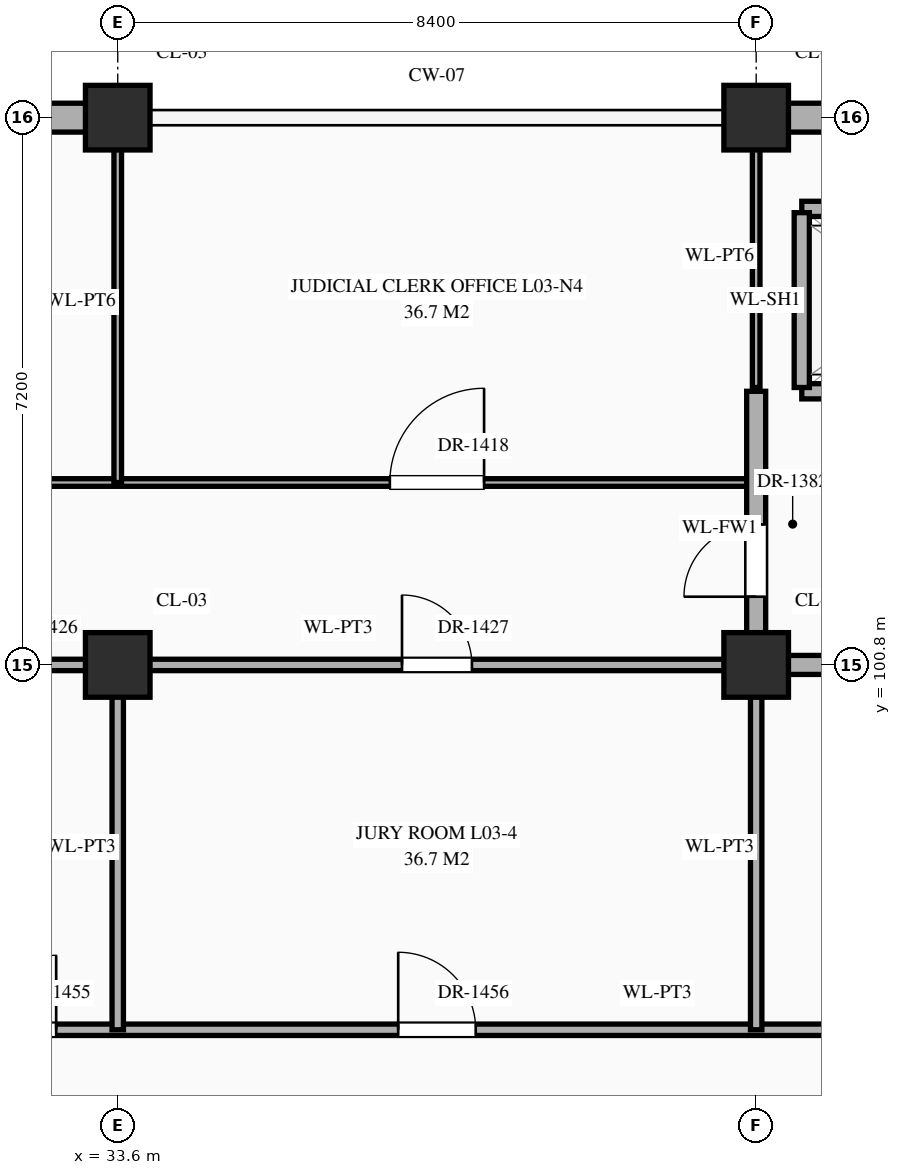
"""IFC4 building model, lengths in metres.
Left out: names, types, materials, properties, quantities, classifications, styles, units other than length and angle.
Written with IfcOpenShell. Run it as: python <this file> out.ifc"""

import sys

from ifc_helpers import new_model, si_unit, direction, frame, frame_2d, origin, origin_2d, place, context, subcontext, project, spatial, rectangle, extrude, element, fill, save


model = new_model("IFC4")
c1 = context("Model", 3, precision=1e-05, world=origin(), true_north=direction((0.0, 1.0)))
c2 = subcontext(c1, "Body", "Model", "MODEL_VIEW")
j1 = project(units=[si_unit("LENGTHUNIT", "METRE"), si_unit("PLANEANGLEUNIT", "RADIAN")], contexts=[c1])
p1 = place(None, origin())
s1 = spatial("IfcSite", under=j1, at=p1, CompositionType="ELEMENT")
p2 = place(p1, origin())
s2 = spatial("IfcBuilding", under=s1, at=p2, CompositionType="ELEMENT")
p3 = place(p2, frame((0.0, 0.0, 10.8)))
s3 = spatial("IfcBuildingStorey", under=s2, at=p3, CompositionType="ELEMENT", Elevation=10.8)
for number, where, z_axis, x_axis in (
    (1, (33.6, 100.8, 0.0), (0.0, 0.0, 1.0), (1.0, 0.0, 0.0)),
    (2, (33.6, 108.0, 0.0), (0.0, 0.0, 1.0), (1.0, 0.0, 0.0)),
    (3, (42.0, 100.8, 0.0), (0.0, 0.0, 1.0), (1.0, 0.0, 0.0)),
    (4, (42.0, 108.0, 0.0), (0.0, 0.0, 1.0), (1.0, 0.0, 0.0)),
):
    element("IfcColumn", number, at=place(p3, frame(where, z_axis=z_axis, x_axis=x_axis)), inside=s3, PredefinedType="COLUMN", context=c2, shape_type="SweptSolid", body=[
        extrude(rectangle(XDim=0.85, YDim=0.85, at=origin_2d()), origin(), (0.0, 0.0, 1.0), 5.4),
    ])
p4 = place(p3, frame((25.62, 108.0, 0.0), z_axis=(0.0, 0.0, 1.0), x_axis=(1.0, 0.0, 0.0)))
e5 = element("IfcWall", 5, at=p4, inside=s3, PredefinedType="STANDARD", context=c2, shape_type="SweptSolid", body=[
    extrude(rectangle(XDim=7.56, YDim=0.38, at=frame_2d((3.78, 0.0))), origin(), (0.0, 0.0, 1.0), 4.47),
])
p5 = place(p4, frame((5.255, 0.0, 0.85)))
e6 = element("IfcOpeningElement", 6, at=p5, cuts=e5, PredefinedType="OPENING", context=c2, shape_type="SweptSolid", body=[
    extrude(rectangle(XDim=1.05, YDim=1.2, at=frame_2d((0.525, 0.6))), frame((0.0, 0.202, 0.0), z_axis=(0.0, -1.0, 0.0), x_axis=(1.0, 0.0, 0.0)), (0.0, 0.0, 1.0), 0.404),
])
p6 = place(p3, frame((42.42, 108.0, 0.0), z_axis=(0.0, 0.0, 1.0), x_axis=(1.0, 0.0, 0.0)))
e7 = element("IfcWall", 7, at=p6, inside=s3, PredefinedType="STANDARD", context=c2, shape_type="SweptSolid", body=[
    extrude(rectangle(XDim=7.535, YDim=0.38, at=frame_2d((3.768, 0.0))), origin(), (0.0, 0.0, 1.0), 4.47),
])
p7 = place(p3, frame((31.0, 96.0, 0.0), z_axis=(0.0, 0.0, 1.0), x_axis=(1.0, 0.0, 0.0)))
e8 = element("IfcWall", 8, at=p7, inside=s3, PredefinedType="STANDARD", context=c2, shape_type="SweptSolid", body=[
    extrude(rectangle(XDim=19.4, YDim=0.15, at=frame_2d((9.7, 0.0))), origin(), (0.0, 0.0, 1.0), 5.12),
])
p8 = place(p7, frame((0.81, 0.0, 0.0)))
e9 = element("IfcOpeningElement", 9, at=p8, cuts=e8, PredefinedType="OPENING", context=c2, shape_type="SweptSolid", body=[
    extrude(rectangle(XDim=0.98, YDim=2.35, at=frame_2d((0.49, 1.175))), frame((0.0, 0.087, 0.0), z_axis=(0.0, -1.0, 0.0), x_axis=(1.0, 0.0, 0.0)), (0.0, 0.0, 1.0), 0.174),
])
p9 = place(p7, frame((6.29, 0.0, 0.0)))
e10 = element("IfcOpeningElement", 10, at=p9, cuts=e8, PredefinedType="OPENING", context=c2, shape_type="SweptSolid", body=[
    extrude(rectangle(XDim=1.02, YDim=2.4, at=frame_2d((0.51, 1.2))), frame((0.0, 0.087, 0.0), z_axis=(0.0, -1.0, 0.0), x_axis=(1.0, 0.0, 0.0)), (0.0, 0.0, 1.0), 0.174),
])
p10 = place(p7, frame((14.67, 0.0, 0.0)))
e11 = element("IfcOpeningElement", 11, at=p10, cuts=e8, PredefinedType="OPENING", context=c2, shape_type="SweptSolid", body=[
    extrude(rectangle(XDim=1.06, YDim=2.4, at=frame_2d((0.53, 1.2))), frame((0.0, 0.087, 0.0), z_axis=(0.0, -1.0, 0.0), x_axis=(1.0, 0.0, 0.0)), (0.0, 0.0, 1.0), 0.174),
])
p11 = place(p3, frame((31.0, 100.8, 0.0), z_axis=(0.0, 0.0, 1.0), x_axis=(1.0, 0.0, 0.0)))
e12 = element("IfcWall", 12, at=p11, inside=s3, PredefinedType="STANDARD", context=c2, shape_type="SweptSolid", body=[
    extrude(rectangle(XDim=11.0, YDim=0.15, at=frame_2d((5.5, 0.0))), origin(), (0.0, 0.0, 1.0), 4.27),
])
p12 = place(p11, frame((0.698, 0.0, 0.0)))
e13 = element("IfcOpeningElement", 13, at=p12, cuts=e12, PredefinedType="OPENING", context=c2, shape_type="SweptSolid", body=[
    extrude(rectangle(XDim=0.86, YDim=2.1, at=frame_2d((0.43, 1.05))), frame((0.0, 0.087, 0.0), z_axis=(0.0, -1.0, 0.0), x_axis=(1.0, 0.0, 0.0)), (0.0, 0.0, 1.0), 0.174),
])
p13 = place(p11, frame((6.34, 0.0, 0.0)))
e14 = element("IfcOpeningElement", 14, at=p13, cuts=e12, PredefinedType="OPENING", context=c2, shape_type="SweptSolid", body=[
    extrude(rectangle(XDim=0.92, YDim=2.15, at=frame_2d((0.46, 1.075))), frame((0.0, 0.087, 0.0), z_axis=(0.0, -1.0, 0.0), x_axis=(1.0, 0.0, 0.0)), (0.0, 0.0, 1.0), 0.174),
])
p14 = place(p3, frame((42.0, 100.8, 0.0), z_axis=(0.0, 0.0, 1.0), x_axis=(1.0, 0.0, 0.0)))
e15 = element("IfcWall", 15, at=p14, inside=s3, PredefinedType="STANDARD", context=c2, shape_type="SweptSolid", body=[
    extrude(rectangle(XDim=4.2, YDim=0.25, at=frame_2d((2.1, 0.0))), origin(), (0.0, 0.0, 1.0), 4.27),
])
p15 = place(p3, frame((0.04, 103.2, 0.0), z_axis=(0.0, 0.0, 1.0), x_axis=(1.0, 0.0, 0.0)))
e16 = element("IfcWall", 16, at=p15, inside=s3, PredefinedType="STANDARD", context=c2, shape_type="SweptSolid", body=[
    extrude(rectangle(XDim=41.96, YDim=0.1, at=frame_2d((20.98, 0.0))), origin(), (0.0, 0.0, 1.0), 5.12),
])
p16 = place(p15, frame((3.64, 0.0, 0.0)))
e17 = element("IfcOpeningElement", 17, at=p16, cuts=e16, PredefinedType="OPENING", context=c2, shape_type="SweptSolid", body=[
    extrude(rectangle(XDim=1.08, YDim=2.25, at=frame_2d((0.54, 1.125))), frame((0.0, 0.062, 0.0), z_axis=(0.0, -1.0, 0.0), x_axis=(1.0, 0.0, 0.0)), (0.0, 0.0, 1.0), 0.124),
])
p17 = place(p15, frame((12.0, 0.0, 0.0)))
e18 = element("IfcOpeningElement", 18, at=p17, cuts=e16, PredefinedType="OPENING", context=c2, shape_type="SweptSolid", body=[
    extrude(rectangle(XDim=1.12, YDim=2.25, at=frame_2d((0.56, 1.125))), frame((0.0, 0.062, 0.0), z_axis=(0.0, -1.0, 0.0), x_axis=(1.0, 0.0, 0.0)), (0.0, 0.0, 1.0), 0.124),
])
p18 = place(p15, frame((20.38, 0.0, 0.0)))
e19 = element("IfcOpeningElement", 19, at=p18, cuts=e16, PredefinedType="OPENING", context=c2, shape_type="SweptSolid", body=[
    extrude(rectangle(XDim=1.16, YDim=2.3, at=frame_2d((0.58, 1.15))), frame((0.0, 0.062, 0.0), z_axis=(0.0, -1.0, 0.0), x_axis=(1.0, 0.0, 0.0)), (0.0, 0.0, 1.0), 0.124),
])
p19 = place(p15, frame((28.76, 0.0, 0.0)))
e20 = element("IfcOpeningElement", 20, at=p19, cuts=e16, PredefinedType="OPENING", context=c2, shape_type="SweptSolid", body=[
    extrude(rectangle(XDim=1.2, YDim=2.35, at=frame_2d((0.6, 1.175))), frame((0.0, 0.062, 0.0), z_axis=(0.0, -1.0, 0.0), x_axis=(1.0, 0.0, 0.0)), (0.0, 0.0, 1.0), 0.124),
])
p20 = place(p15, frame((37.14, 0.0, 0.0)))
e21 = element("IfcOpeningElement", 21, at=p20, cuts=e16, PredefinedType="OPENING", context=c2, shape_type="SweptSolid", body=[
    extrude(rectangle(XDim=1.24, YDim=2.3, at=frame_2d((0.62, 1.15))), frame((0.0, 0.062, 0.0), z_axis=(0.0, -1.0, 0.0), x_axis=(1.0, 0.0, 0.0)), (0.0, 0.0, 1.0), 0.124),
])
p21 = place(p3, frame((42.6, 104.4, 0.0), z_axis=(0.0, 0.0, 1.0), x_axis=(1.0, 0.0, 0.0)))
e22 = element("IfcWall", 22, at=p21, inside=s3, PredefinedType="STANDARD", context=c2, shape_type="SweptSolid", body=[
    extrude(rectangle(XDim=3.0, YDim=0.2, at=frame_2d((1.5, 0.0))), origin(), (0.0, 0.0, 1.0), 5.12),
])
p22 = place(p21, frame((0.9, 0.0, 0.0)))
e23 = element("IfcOpeningElement", 23, at=p22, cuts=e22, PredefinedType="OPENING", context=c2, shape_type="SweptSolid", body=[
    extrude(rectangle(XDim=1.2, YDim=2.15, at=frame_2d((0.6, 1.075))), frame((0.0, 0.112, 0.0), z_axis=(0.0, -1.0, 0.0), x_axis=(1.0, 0.0, 0.0)), (0.0, 0.0, 1.0), 0.224),
])
p23 = place(p3, frame((42.6, 106.8, 0.0), z_axis=(0.0, 0.0, 1.0), x_axis=(1.0, 0.0, 0.0)))
e24 = element("IfcWall", 24, at=p23, inside=s3, PredefinedType="STANDARD", context=c2, shape_type="SweptSolid", body=[
    extrude(rectangle(XDim=3.0, YDim=0.2, at=frame_2d((1.5, 0.0))), origin(), (0.0, 0.0, 1.0), 5.12),
])
p24 = place(p3, frame((33.6, 96.0, 0.0), z_axis=(0.0, 0.0, 1.0), x_axis=(0.0, 1.0, 0.0)))
e25 = element("IfcWall", 25, at=p24, inside=s3, PredefinedType="STANDARD", context=c2, shape_type="SweptSolid", body=[
    extrude(rectangle(XDim=4.8, YDim=0.15, at=frame_2d((2.4, 0.0))), origin(), (0.0, 0.0, 1.0), 4.37),
])
p25 = place(p3, frame((33.6, 103.2, 0.0), z_axis=(0.0, 0.0, 1.0), x_axis=(0.0, 1.0, 0.0)))
e26 = element("IfcWall", 26, at=p25, inside=s3, PredefinedType="STANDARD", context=c2, shape_type="SweptSolid", body=[
    extrude(rectangle(XDim=4.76, YDim=0.1, at=frame_2d((2.38, 0.0))), origin(), (0.0, 0.0, 1.0), 4.37),
])
p26 = place(p3, frame((42.0, 96.0, 0.0), z_axis=(0.0, 0.0, 1.0), x_axis=(0.0, 1.0, 0.0)))
e27 = element("IfcWall", 27, at=p26, inside=s3, PredefinedType="STANDARD", context=c2, shape_type="SweptSolid", body=[
    extrude(rectangle(XDim=4.8, YDim=0.15, at=frame_2d((2.4, 0.0))), origin(), (0.0, 0.0, 1.0), 4.37),
])
p27 = place(p3, frame((42.0, 100.8, 0.0), z_axis=(0.0, 0.0, 1.0), x_axis=(0.0, 1.0, 0.0)))
e28 = element("IfcWall", 28, at=p27, inside=s3, PredefinedType="STANDARD", context=c2, shape_type="SweptSolid", body=[
    extrude(rectangle(XDim=3.6, YDim=0.25, at=frame_2d((1.8, 0.0))), origin(), (0.0, 0.0, 1.0), 4.37),
])
p28 = place(p27, frame((0.897, 0.0, 0.0)))
e29 = element("IfcOpeningElement", 29, at=p28, cuts=e28, PredefinedType="OPENING", context=c2, shape_type="SweptSolid", body=[
    extrude(rectangle(XDim=0.95, YDim=2.15, at=frame_2d((0.475, 1.075))), frame((0.0, 0.137, 0.0), z_axis=(0.0, -1.0, 0.0), x_axis=(1.0, 0.0, 0.0)), (0.0, 0.0, 1.0), 0.274),
])
p29 = place(p3, frame((42.0, 104.45, 0.0), z_axis=(0.0, 0.0, 1.0), x_axis=(0.0, 1.0, 0.0)))
e30 = element("IfcWall", 30, at=p29, inside=s3, PredefinedType="STANDARD", context=c2, shape_type="SweptSolid", body=[
    extrude(rectangle(XDim=3.46, YDim=0.1, at=frame_2d((1.73, 0.0))), origin(), (0.0, 0.0, 1.0), 4.37),
])
p30 = place(p3, frame((42.6, 104.45, 0.0), z_axis=(0.0, 0.0, 1.0), x_axis=(0.0, 1.0, 0.0)))
e31 = element("IfcWall", 31, at=p30, inside=s3, PredefinedType="STANDARD", context=c2, shape_type="SweptSolid", body=[
    extrude(rectangle(XDim=2.3, YDim=0.2, at=frame_2d((1.15, 0.0))), origin(), (0.0, 0.0, 1.0), 5.12),
])
p31 = place(p28, origin())
e32 = element("IfcDoor", 32, at=p31, inside=s3, OperationType="SINGLE_SWING_LEFT", PredefinedType="DOOR", context=c2, shape_type="SweptSolid", body=[
    extrude(rectangle(XDim=0.95, YDim=2.15, at=frame_2d((0.475, 1.075))), frame((0.0, 0.025, 0.0), z_axis=(0.0, -1.0, 0.0), x_axis=(1.0, 0.0, 0.0)), (0.0, 0.0, 1.0), 0.05),
])
fill(e29, e32)
p32 = place(p20, origin())
e33 = element("IfcDoor", 33, at=p32, inside=s3, OperationType="SINGLE_SWING_RIGHT", PredefinedType="DOOR", context=c2, shape_type="SweptSolid", body=[
    extrude(rectangle(XDim=1.24, YDim=2.3, at=frame_2d((0.62, 1.15))), frame((0.0, 0.025, 0.0), z_axis=(0.0, -1.0, 0.0), x_axis=(1.0, 0.0, 0.0)), (0.0, 0.0, 1.0), 0.05),
])
fill(e21, e33)
p33 = place(p13, origin())
e34 = element("IfcDoor", 34, at=p33, inside=s3, OperationType="SINGLE_SWING_LEFT", PredefinedType="DOOR", context=c2, shape_type="SweptSolid", body=[
    extrude(rectangle(XDim=0.92, YDim=2.15, at=frame_2d((0.46, 1.075))), frame((0.0, 0.025, 0.0), z_axis=(0.0, -1.0, 0.0), x_axis=(1.0, 0.0, 0.0)), (0.0, 0.0, 1.0), 0.05),
])
fill(e14, e34)
p34 = place(p8, origin())
e35 = element("IfcDoor", 35, at=p34, inside=s3, OperationType="SINGLE_SWING_RIGHT", PredefinedType="DOOR", context=c2, shape_type="SweptSolid", body=[
    extrude(rectangle(XDim=0.98, YDim=2.35, at=frame_2d((0.49, 1.175))), frame((0.0, 0.025, 0.0), z_axis=(0.0, -1.0, 0.0), x_axis=(1.0, 0.0, 0.0)), (0.0, 0.0, 1.0), 0.05),
])
fill(e9, e35)
p35 = place(p9, origin())
e36 = element("IfcDoor", 36, at=p35, inside=s3, OperationType="SINGLE_SWING_LEFT", PredefinedType="DOOR", context=c2, shape_type="SweptSolid", body=[
    extrude(rectangle(XDim=1.02, YDim=2.4, at=frame_2d((0.51, 1.2))), frame((0.0, 0.025, 0.0), z_axis=(0.0, -1.0, 0.0), x_axis=(1.0, 0.0, 0.0)), (0.0, 0.0, 1.0), 0.05),
])
fill(e10, e36)
save(model, sys.argv[1])
